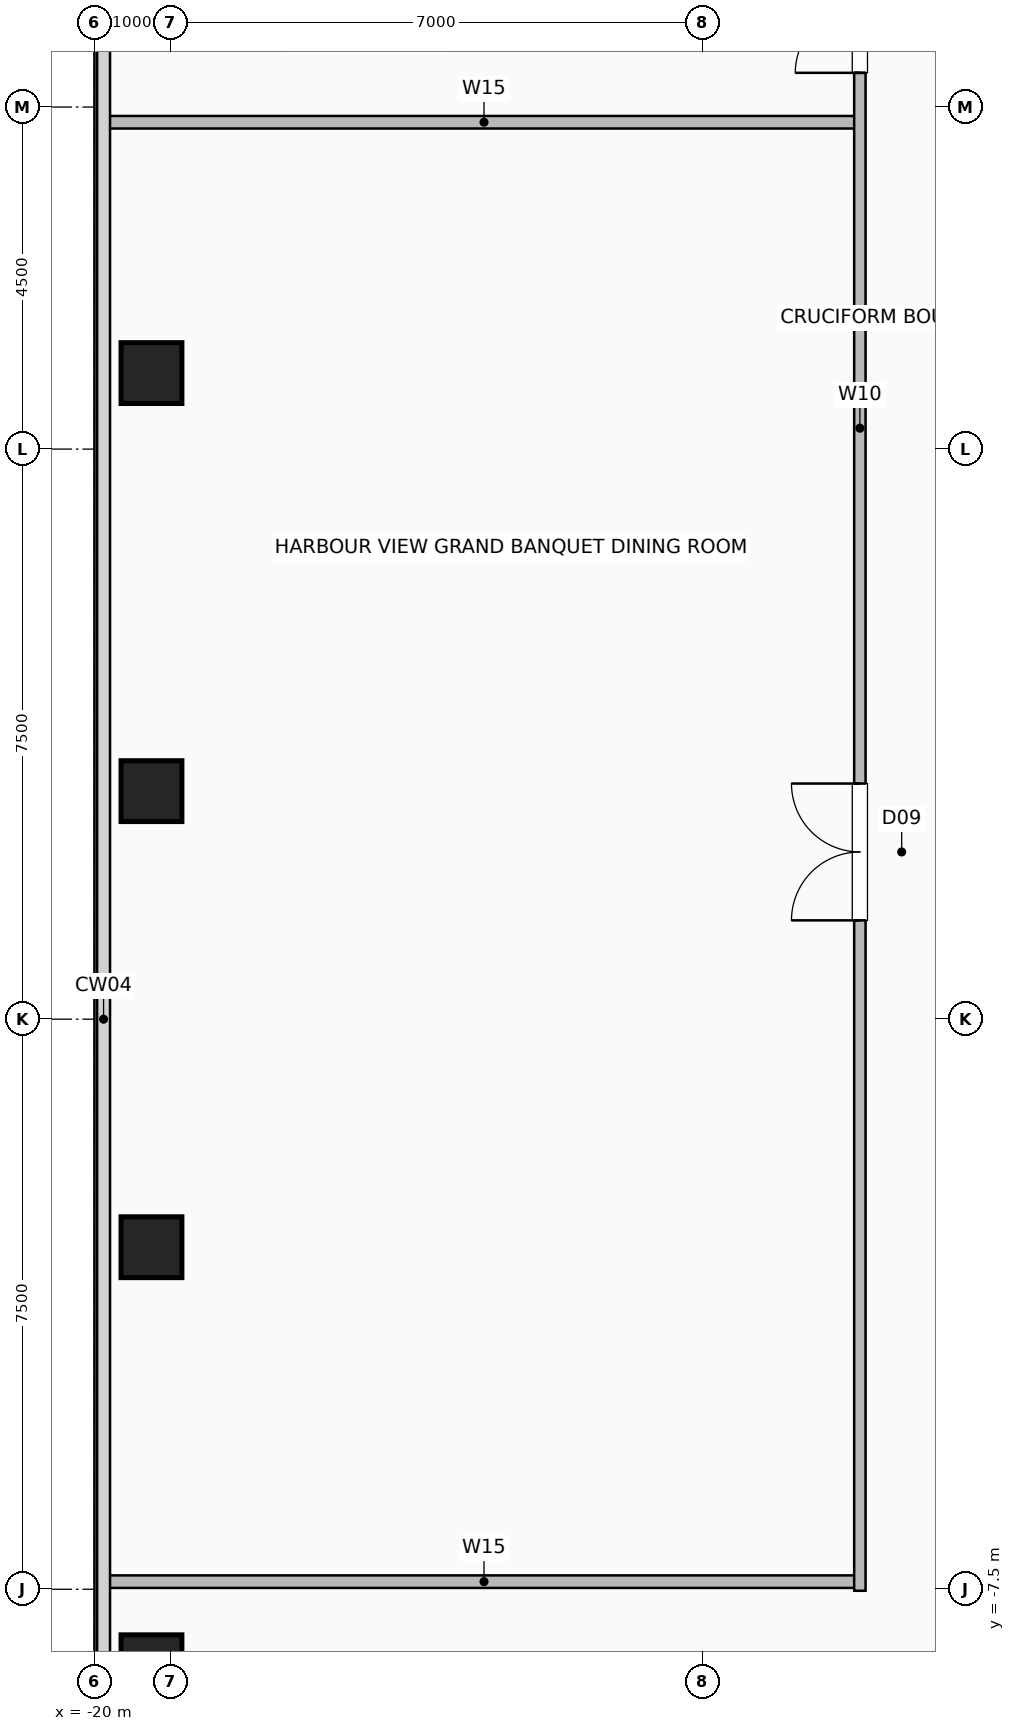
"""IFC4 building model, lengths in metres.
Left out: names, types, materials, properties, quantities, classifications, styles, units other than length and angle.
Written with IfcOpenShell. Run it as: python <this file> out.ifc"""

import sys

from ifc_helpers import new_model, si_unit, direction, frame, frame_2d, origin, origin_2d, place, context, subcontext, project, spatial, rectangle, hollow_rectangle, extrude, element, fill, save


model = new_model("IFC4")
c1 = context("Model", 3, precision=1e-05, world=origin(), true_north=direction((0.0, 1.0)))
c2 = subcontext(c1, "Body", "Model", "MODEL_VIEW")
j1 = project(units=[si_unit("LENGTHUNIT", "METRE"), si_unit("PLANEANGLEUNIT", "RADIAN")], contexts=[c1])
p1 = place(None, origin())
s1 = spatial("IfcSite", under=j1, at=p1, CompositionType="ELEMENT")
p2 = place(p1, origin())
s2 = spatial("IfcBuilding", under=s1, at=p2, CompositionType="ELEMENT")
p3 = place(p2, frame((0.0, 0.0, 198.6)))
s3 = spatial("IfcBuildingStorey", under=s2, at=p3, CompositionType="ELEMENT", Elevation=198.6)
for number, where, z_axis, x_axis in (
    (1, (-19.25, -8.5, 0.0), (0.0, 0.0, 1.0), (1.0, 0.0, 0.0)),
    (2, (-19.25, -3.0, 0.0), (0.0, 0.0, 1.0), (1.0, 0.0, 0.0)),
    (3, (-19.25, 3.0, 0.0), (0.0, 0.0, 1.0), (1.0, 0.0, 0.0)),
    (4, (-19.25, 8.5, 0.0), (0.0, 0.0, 1.0), (1.0, 0.0, 0.0)),
):
    element("IfcColumn", number, at=place(p3, frame(where, z_axis=z_axis, x_axis=x_axis)), inside=s3, PredefinedType="COLUMN", context=c2, shape_type="SweptSolid", body=[
        extrude(hollow_rectangle(XDim=0.8, YDim=0.8, WallThickness=0.04, at=origin_2d()), origin(), (0.0, 0.0, 1.0), 3.6),
    ])
for number, where, z_axis, x_axis in (
    (5, (-19.82, -7.4, 0.0), (0.0, 0.0, 1.0), (1.0, 0.0, 0.0)),
    (6, (-19.82, 11.8, 0.0), (0.0, 0.0, 1.0), (1.0, 0.0, 0.0)),
):
    element("IfcWall", number, at=place(p3, frame(where, z_axis=z_axis, x_axis=x_axis)), inside=s3, PredefinedType="PLUMBINGWALL", context=c2, shape_type="SweptSolid", body=[
        extrude(rectangle(XDim=9.89, YDim=0.165, at=frame_2d((4.945, 0.0))), origin(), (0.0, 0.0, 1.0), 3.36),
    ])
p4 = place(p3, frame((-9.93, -7.52, 0.0), z_axis=(0.0, 0.0, 1.0), x_axis=(0.0, 1.0, 0.0)))
e7 = element("IfcWall", 7, at=p4, inside=s3, PredefinedType="PARTITIONING", context=c2, shape_type="SweptSolid", body=[
    extrude(rectangle(XDim=21.59, YDim=0.15, at=frame_2d((10.795, 0.0))), origin(), (0.0, 0.0, 1.0), 3.36),
])
p5 = place(p4, frame((8.82, 0.0, 0.0)))
e8 = element("IfcOpeningElement", 8, at=p5, cuts=e7, PredefinedType="OPENING", context=c2, shape_type="SweptSolid", body=[
    extrude(rectangle(XDim=1.8, YDim=2.08, at=frame_2d((0.9, 1.04))), frame((0.0, 0.085, 0.0), z_axis=(0.0, -1.0, 0.0), x_axis=(1.0, 0.0, 0.0)), (0.0, 0.0, 1.0), 0.17),
])
p6 = place(p4, frame((19.97, 0.0, 0.0)))
e9 = element("IfcOpeningElement", 9, at=p6, cuts=e7, PredefinedType="OPENING", context=c2, shape_type="SweptSolid", body=[
    extrude(rectangle(XDim=0.85, YDim=2.05, at=frame_2d((0.425, 1.025))), frame((0.0, 0.085, 0.0), z_axis=(0.0, -1.0, 0.0), x_axis=(1.0, 0.0, 0.0)), (0.0, 0.0, 1.0), 0.17),
])
p7 = place(p5, origin())
e10 = element("IfcDoor", 10, at=p7, inside=s3, OperationType="DOUBLE_DOOR_SINGLE_SWING", PredefinedType="DOOR", context=c2, shape_type="SweptSolid", body=[
    extrude(rectangle(XDim=1.8, YDim=2.08, at=frame_2d((0.9, 1.04))), frame((0.0, 0.025, 0.0), z_axis=(0.0, -1.0, 0.0), x_axis=(1.0, 0.0, 0.0)), (0.0, 0.0, 1.0), 0.05),
])
fill(e8, e10)
p8 = place(p6, origin())
e11 = element("IfcDoor", 11, at=p8, inside=s3, OperationType="SINGLE_SWING_LEFT", PredefinedType="DOOR", context=c2, shape_type="SweptSolid", body=[
    extrude(rectangle(XDim=0.85, YDim=2.05, at=frame_2d((0.425, 1.025))), frame((0.0, 0.025, 0.0), z_axis=(0.0, -1.0, 0.0), x_axis=(1.0, 0.0, 0.0)), (0.0, 0.0, 1.0), 0.05),
])
fill(e9, e11)
save(model, sys.argv[1])
